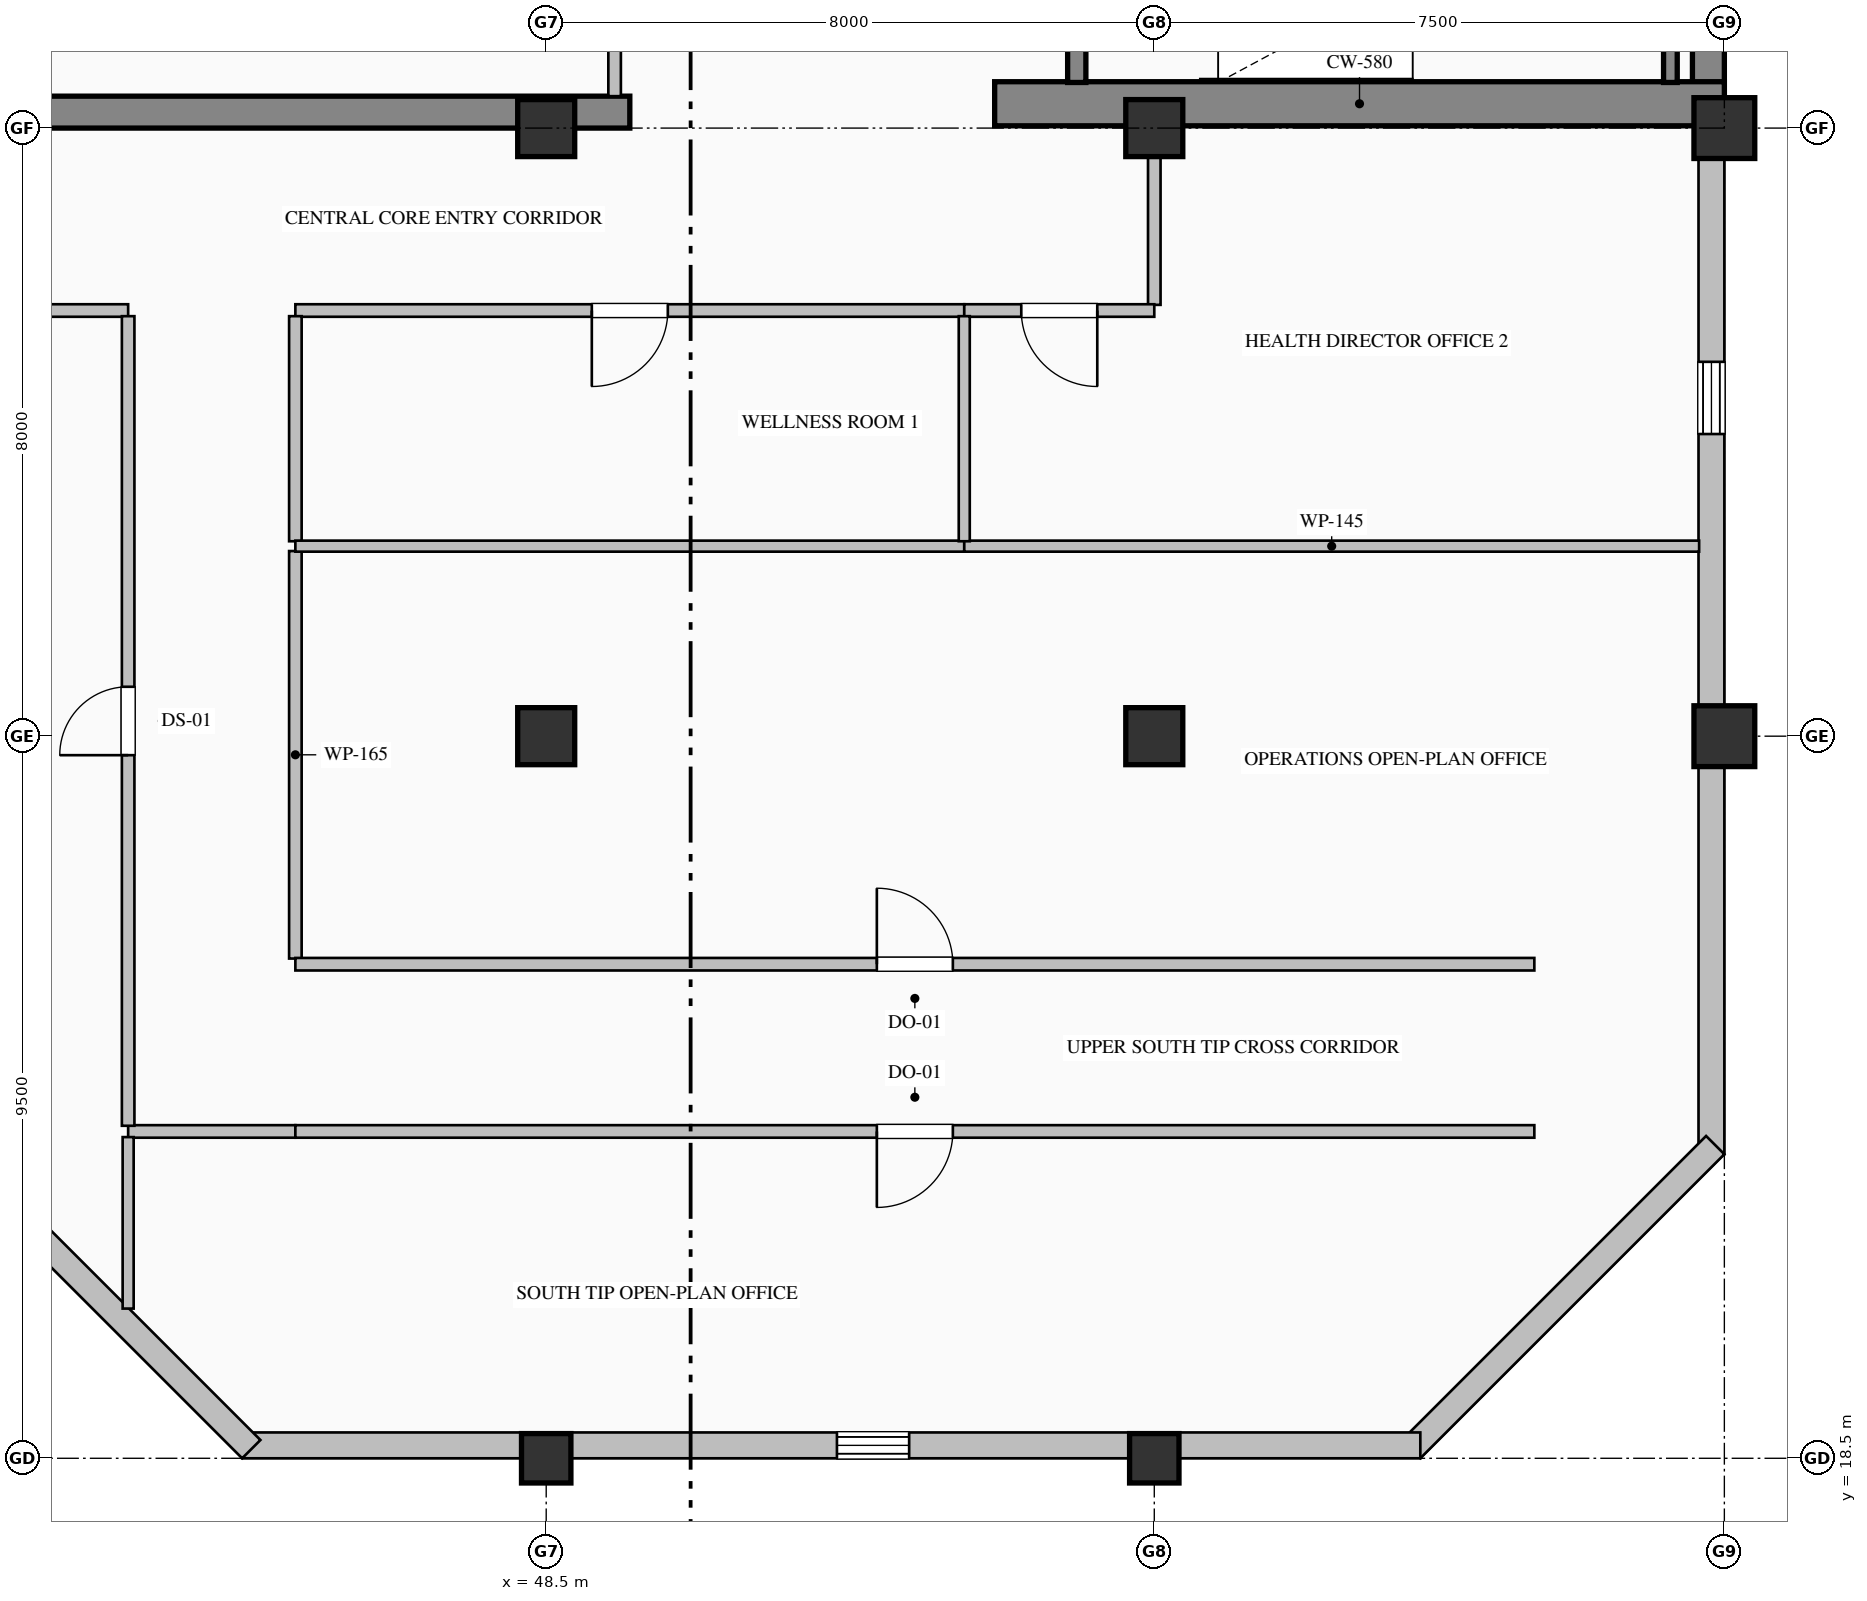
"""IFC4 building model, lengths in metres.
Left out: names, types, materials, properties, quantities, classifications, styles, units other than length and angle.
Written with IfcOpenShell. Run it as: python <this file> out.ifc"""

import sys

from ifc_helpers import new_model, si_unit, direction, frame, frame_2d, origin, origin_2d, place, context, subcontext, project, spatial, rectangle, hollow_rectangle, extrude, element, fill, save


model = new_model("IFC4")
c1 = context("Model", 3, precision=1e-05, world=origin(), true_north=direction((0.0, 1.0)))
c2 = subcontext(c1, "Body", "Model", "MODEL_VIEW")
j1 = project(units=[si_unit("LENGTHUNIT", "METRE"), si_unit("PLANEANGLEUNIT", "RADIAN")], contexts=[c1])
p1 = place(None, origin())
s1 = spatial("IfcSite", under=j1, at=p1, CompositionType="ELEMENT")
p2 = place(p1, origin())
s2 = spatial("IfcBuilding", under=s1, at=p2, CompositionType="ELEMENT")
p3 = place(p2, frame((0.0, 0.0, 347.2)))
s3 = spatial("IfcBuildingStorey", under=s2, at=p3, CompositionType="ELEMENT", Elevation=347.2)
p4 = place(p3, frame((63.79, 36.32, 0.0), z_axis=(0.0, 0.0, 1.0), x_axis=(0.0, 1.0, 0.0)))
e1 = element("IfcWall", 1, at=p4, inside=s3, PredefinedType="SHEAR", context=c2, shape_type="SweptSolid", body=[
    extrude(rectangle(XDim=15.26, YDim=0.42, at=frame_2d((7.63, 0.0))), origin(), (0.0, 0.0, 1.0), 3.785),
])
p5 = place(p3, frame((40.5, 36.21, 0.0), z_axis=(0.0, 0.0, 1.0), x_axis=(1.0, 0.0, 0.0)))
e2 = element("IfcWall", 2, at=p5, inside=s3, PredefinedType="SHEAR", context=c2, shape_type="SweptSolid", body=[
    extrude(rectangle(XDim=9.1, YDim=0.42, at=frame_2d((4.55, 0.0))), origin(), (0.0, 0.0, 1.0), 3.785),
])
p6 = place(p3, frame((54.4, 36.32, 0.0), z_axis=(0.0, 0.0, 1.0), x_axis=(1.0, 0.0, 0.0)))
e3 = element("IfcWall", 3, at=p6, inside=s3, PredefinedType="SHEAR", context=c2, shape_type="SweptSolid", body=[
    extrude(rectangle(XDim=9.6, YDim=0.58, at=frame_2d((4.8, 0.0))), origin(), (0.0, 0.0, 1.0), 4.0),
])
p7 = place(p3, frame((48.5, 18.5, 0.0), z_axis=(0.0, 0.0, 1.0), x_axis=(1.0, 0.0, 0.0)))
e4 = element("IfcColumn", 4, at=p7, inside=s3, PredefinedType="COLUMN", context=c2, shape_type="SweptSolid", body=[
    extrude(hollow_rectangle(XDim=0.65, YDim=0.65, WallThickness=0.028, at=origin_2d()), origin(), (0.0, 0.0, 1.0), 4.0),
])
for number, where, z_axis, x_axis in (
    (5, (48.5, 28.0, 0.0), (0.0, 0.0, 1.0), (1.0, 0.0, 0.0)),
    (6, (48.5, 36.0, 0.0), (0.0, 0.0, 1.0), (1.0, 0.0, 0.0)),
):
    element("IfcColumn", number, at=place(p3, frame(where, z_axis=z_axis, x_axis=x_axis)), inside=s3, PredefinedType="COLUMN", context=c2, shape_type="SweptSolid", body=[
        extrude(rectangle(XDim=0.75, YDim=0.75, at=origin_2d()), origin(), (0.0, 0.0, 1.0), 4.0),
    ])
p8 = place(p3, frame((56.5, 18.5, 0.0), z_axis=(0.0, 0.0, 1.0), x_axis=(1.0, 0.0, 0.0)))
e7 = element("IfcColumn", 7, at=p8, inside=s3, PredefinedType="COLUMN", context=c2, shape_type="SweptSolid", body=[
    extrude(hollow_rectangle(XDim=0.65, YDim=0.65, WallThickness=0.028, at=origin_2d()), origin(), (0.0, 0.0, 1.0), 4.0),
])
for number, where, z_axis, x_axis in (
    (8, (56.5, 28.0, 0.0), (0.0, 0.0, 1.0), (1.0, 0.0, 0.0)),
    (9, (56.5, 36.0, 0.0), (0.0, 0.0, 1.0), (1.0, 0.0, 0.0)),
):
    element("IfcColumn", number, at=place(p3, frame(where, z_axis=z_axis, x_axis=x_axis)), inside=s3, PredefinedType="COLUMN", context=c2, shape_type="SweptSolid", body=[
        extrude(rectangle(XDim=0.75, YDim=0.75, at=origin_2d()), origin(), (0.0, 0.0, 1.0), 4.0),
    ])
for number, where, z_axis, x_axis in (
    (10, (64.0, 28.0, 0.0), (0.0, 0.0, 1.0), (1.0, 0.0, 0.0)),
    (11, (64.0, 36.0, 0.0), (0.0, 0.0, 1.0), (1.0, 0.0, 0.0)),
):
    element("IfcColumn", number, at=place(p3, frame(where, z_axis=z_axis, x_axis=x_axis)), inside=s3, PredefinedType="COLUMN", context=c2, shape_type="SweptSolid", body=[
        extrude(hollow_rectangle(XDim=0.8, YDim=0.8, WallThickness=0.032, at=origin_2d()), origin(), (0.0, 0.0, 1.0), 4.0),
    ])
p9 = place(p3, frame((63.83, 36.05, 0.0), z_axis=(0.0, 0.0, 1.0), x_axis=(0.0, -1.0, 0.0)))
e12 = element("IfcWall", 12, at=p9, inside=s3, PredefinedType="SOLIDWALL", context=c2, shape_type="SweptSolid", body=[
    extrude(rectangle(XDim=13.55, YDim=0.34, at=frame_2d((6.775, 0.0))), origin(), (0.0, 0.0, 1.0), 3.335),
])
p10 = place(p9, frame((3.125, 0.0, 0.9)))
e13 = element("IfcOpeningElement", 13, at=p10, cuts=e12, PredefinedType="OPENING", context=c2, shape_type="SweptSolid", body=[
    extrude(rectangle(XDim=0.95, YDim=1.85, at=frame_2d((0.475, 0.925))), frame((0.0, 0.18, 0.0), z_axis=(0.0, -1.0, 0.0), x_axis=(1.0, 0.0, 0.0)), (0.0, 0.0, 1.0), 0.36),
])
p11 = place(p3, frame((63.88, 22.62, 0.0), z_axis=(0.0, 0.0, 1.0), x_axis=(-0.707106781187, -0.707106781187, 0.0)))
e14 = element("IfcWall", 14, at=p11, inside=s3, PredefinedType="SOLIDWALL", context=c2, shape_type="SweptSolid", body=[
    extrude(rectangle(XDim=5.657, YDim=0.34, at=frame_2d((2.828, 0.0))), origin(), (0.0, 0.0, 1.0), 3.785),
])
p12 = place(p3, frame((60.0, 18.67, 0.0), z_axis=(0.0, 0.0, 1.0), x_axis=(-1.0, 0.0, 0.0)))
e15 = element("IfcWall", 15, at=p12, inside=s3, PredefinedType="SOLIDWALL", context=c2, shape_type="SweptSolid", body=[
    extrude(rectangle(XDim=15.5, YDim=0.34, at=frame_2d((7.75, 0.0))), origin(), (0.0, 0.0, 1.0), 3.335),
])
p13 = place(p12, frame((6.725, 0.0, 0.9)))
e16 = element("IfcOpeningElement", 16, at=p13, cuts=e15, PredefinedType="OPENING", context=c2, shape_type="SweptSolid", body=[
    extrude(rectangle(XDim=0.95, YDim=1.85, at=frame_2d((0.475, 0.925))), frame((0.0, 0.18, 0.0), z_axis=(0.0, -1.0, 0.0), x_axis=(1.0, 0.0, 0.0)), (0.0, 0.0, 1.0), 0.36),
])
p14 = place(p3, frame((44.62, 18.62, 0.0), z_axis=(0.0, 0.0, 1.0), x_axis=(-0.707106781187, 0.707106781187, 0.0)))
e17 = element("IfcWall", 17, at=p14, inside=s3, PredefinedType="SOLIDWALL", context=c2, shape_type="SweptSolid", body=[
    extrude(rectangle(XDim=5.657, YDim=0.34, at=frame_2d((2.828, 0.0))), origin(), (0.0, 0.0, 1.0), 3.785),
])
p15 = place(p3, frame((55.48, 39.75, 0.0), z_axis=(0.0, 0.0, 1.0), x_axis=(0.0, -1.0, 0.0)))
e18 = element("IfcWall", 18, at=p15, inside=s3, PredefinedType="SOLIDWALL", context=c2, shape_type="SweptSolid", body=[
    extrude(rectangle(XDim=3.15, YDim=0.24, at=frame_2d((1.575, 0.0))), origin(), (0.0, 0.0, 1.0), 4.0),
])
p16 = place(p15, frame((1.0, 0.0, 0.0)))
e19 = element("IfcOpeningElement", 19, at=p16, cuts=e18, PredefinedType="OPENING", context=c2, shape_type="SweptSolid", body=[
    extrude(rectangle(XDim=1.15, YDim=2.2, at=frame_2d((0.575, 1.1))), frame((0.0, 0.13, 0.0), z_axis=(0.0, -1.0, 0.0), x_axis=(1.0, 0.0, 0.0)), (0.0, 0.0, 1.0), 0.26),
])
p17 = place(p3, frame((63.29, 36.6, 0.0), z_axis=(0.0, 0.0, 1.0), x_axis=(0.0, 1.0, 0.0)))
e20 = element("IfcWall", 20, at=p17, inside=s3, PredefinedType="SOLIDWALL", context=c2, shape_type="SweptSolid", body=[
    extrude(rectangle(XDim=3.15, YDim=0.18, at=frame_2d((1.575, 0.0))), origin(), (0.0, 0.0, 1.0), 4.0),
])
p18 = place(p3, frame((49.4, 36.42, 0.0), z_axis=(0.0, 0.0, 1.0), x_axis=(0.0, 1.0, 0.0)))
e21 = element("IfcWall", 21, at=p18, inside=s3, PredefinedType="PARTITIONING", context=c2, shape_type="SweptSolid", body=[
    extrude(rectangle(XDim=3.893, YDim=0.165, at=frame_2d((1.947, 0.0))), origin(), (0.0, 0.0, 1.0), 3.027),
])
p19 = place(p18, frame((1.497, 0.0, 0.0)))
e22 = element("IfcOpeningElement", 22, at=p19, cuts=e21, PredefinedType="OPENING", context=c2, shape_type="SweptSolid", body=[
    extrude(rectangle(XDim=0.9, YDim=2.15, at=frame_2d((0.45, 1.075))), frame((0.0, 0.093, 0.0), z_axis=(0.0, -1.0, 0.0), x_axis=(1.0, 0.0, 0.0)), (0.0, 0.0, 1.0), 0.185),
])
p20 = place(p3, frame((54.0, 33.6, 0.0), z_axis=(0.0, 0.0, 1.0), x_axis=(-1.0, 0.0, 0.0)))
e23 = element("IfcWall", 23, at=p20, inside=s3, PredefinedType="PARTITIONING", context=c2, shape_type="SweptSolid", body=[
    extrude(rectangle(XDim=8.8, YDim=0.165, at=frame_2d((4.4, 0.0))), origin(), (0.0, 0.0, 1.0), 3.785),
])
p21 = place(p20, frame((3.9, 0.0, 0.0)))
e24 = element("IfcOpeningElement", 24, at=p21, cuts=e23, PredefinedType="OPENING", context=c2, shape_type="SweptSolid", body=[
    extrude(rectangle(XDim=1.0, YDim=2.15, at=frame_2d((0.5, 1.075))), frame((0.0, 0.093, 0.0), z_axis=(0.0, -1.0, 0.0), x_axis=(1.0, 0.0, 0.0)), (0.0, 0.0, 1.0), 0.185),
])
p22 = place(p3, frame((56.5, 36.0, 0.0), z_axis=(0.0, 0.0, 1.0), x_axis=(0.0, -1.0, 0.0)))
e25 = element("IfcWall", 25, at=p22, inside=s3, PredefinedType="PARTITIONING", context=c2, shape_type="SweptSolid", body=[
    extrude(rectangle(XDim=2.325, YDim=0.165, at=frame_2d((1.163, 0.0))), origin(), (0.0, 0.0, 1.0), 3.177),
])
p23 = place(p3, frame((56.5, 33.6, 0.0), z_axis=(0.0, 0.0, 1.0), x_axis=(-1.0, 0.0, 0.0)))
e26 = element("IfcWall", 26, at=p23, inside=s3, PredefinedType="PARTITIONING", context=c2, shape_type="SweptSolid", body=[
    extrude(rectangle(XDim=2.5, YDim=0.165, at=frame_2d((1.25, 0.0))), origin(), (0.0, 0.0, 1.0), 3.785),
])
p24 = place(p23, frame((0.75, 0.0, 0.0)))
e27 = element("IfcOpeningElement", 27, at=p24, cuts=e26, PredefinedType="OPENING", context=c2, shape_type="SweptSolid", body=[
    extrude(rectangle(XDim=1.0, YDim=2.15, at=frame_2d((0.5, 1.075))), frame((0.0, 0.093, 0.0), z_axis=(0.0, -1.0, 0.0), x_axis=(1.0, 0.0, 0.0)), (0.0, 0.0, 1.0), 0.185),
])
p25 = place(p3, frame((43.0, 33.6, 0.0), z_axis=(0.0, 0.0, 1.0), x_axis=(-1.0, 0.0, 0.0)))
e28 = element("IfcWall", 28, at=p25, inside=s3, PredefinedType="PARTITIONING", context=c2, shape_type="SweptSolid", body=[
    extrude(rectangle(XDim=2.5, YDim=0.165, at=frame_2d((1.25, 0.0))), origin(), (0.0, 0.0, 1.0), 3.785),
])
p26 = place(p3, frame((45.2, 22.8, 0.0), z_axis=(0.0, 0.0, 1.0), x_axis=(-1.0, 0.0, 0.0)))
e29 = element("IfcWall", 29, at=p26, inside=s3, PredefinedType="PARTITIONING", context=c2, shape_type="SweptSolid", body=[
    extrude(rectangle(XDim=2.2, YDim=0.165, at=frame_2d((1.1, 0.0))), origin(), (0.0, 0.0, 1.0), 3.785),
])
p27 = place(p3, frame((45.2, 30.436, 0.0), z_axis=(0.0, 0.0, 1.0), x_axis=(0.0, -1.0, 0.0)))
e30 = element("IfcWall", 30, at=p27, inside=s3, PredefinedType="PARTITIONING", context=c2, shape_type="SweptSolid", body=[
    extrude(rectangle(XDim=5.361, YDim=0.165, at=frame_2d((2.681, 0.0))), origin(), (0.0, 0.0, 1.0), 3.785),
])
p28 = place(p3, frame((45.2, 33.525, 0.0), z_axis=(0.0, 0.0, 1.0), x_axis=(0.0, -1.0, 0.0)))
e31 = element("IfcWall", 31, at=p28, inside=s3, PredefinedType="PARTITIONING", context=c2, shape_type="SweptSolid", body=[
    extrude(rectangle(XDim=2.961, YDim=0.165, at=frame_2d((1.48, 0.0))), origin(), (0.0, 0.0, 1.0), 3.785),
])
p29 = place(p3, frame((43.0, 22.875, 0.0), z_axis=(0.0, 0.0, 1.0), x_axis=(0.0, 1.0, 0.0)))
e32 = element("IfcWall", 32, at=p29, inside=s3, PredefinedType="PARTITIONING", context=c2, shape_type="SweptSolid", body=[
    extrude(rectangle(XDim=10.651, YDim=0.165, at=frame_2d((5.325, 0.0))), origin(), (0.0, 0.0, 1.0), 3.785),
])
p30 = place(p29, frame((4.875, 0.0, 0.0)))
e33 = element("IfcOpeningElement", 33, at=p30, cuts=e32, PredefinedType="OPENING", context=c2, shape_type="SweptSolid", body=[
    extrude(rectangle(XDim=0.9, YDim=2.15, at=frame_2d((0.45, 1.075))), frame((0.0, 0.093, 0.0), z_axis=(0.0, -1.0, 0.0), x_axis=(1.0, 0.0, 0.0)), (0.0, 0.0, 1.0), 0.185),
])
p31 = place(p3, frame((61.5, 22.8, 0.0), z_axis=(0.0, 0.0, 1.0), x_axis=(-1.0, 0.0, 0.0)))
e34 = element("IfcWall", 34, at=p31, inside=s3, PredefinedType="PARTITIONING", context=c2, shape_type="SweptSolid", body=[
    extrude(rectangle(XDim=16.3, YDim=0.165, at=frame_2d((8.15, 0.0))), origin(), (0.0, 0.0, 1.0), 3.785),
])
p32 = place(p31, frame((7.65, 0.0, 0.0)))
e35 = element("IfcOpeningElement", 35, at=p32, cuts=e34, PredefinedType="OPENING", context=c2, shape_type="SweptSolid", body=[
    extrude(rectangle(XDim=1.0, YDim=2.15, at=frame_2d((0.5, 1.075))), frame((0.0, 0.093, 0.0), z_axis=(0.0, -1.0, 0.0), x_axis=(1.0, 0.0, 0.0)), (0.0, 0.0, 1.0), 0.185),
])
p33 = place(p3, frame((45.2, 25.0, 0.0), z_axis=(0.0, 0.0, 1.0), x_axis=(1.0, 0.0, 0.0)))
e36 = element("IfcWall", 36, at=p33, inside=s3, PredefinedType="PARTITIONING", context=c2, shape_type="SweptSolid", body=[
    extrude(rectangle(XDim=16.3, YDim=0.165, at=frame_2d((8.15, 0.0))), origin(), (0.0, 0.0, 1.0), 3.785),
])
p34 = place(p33, frame((7.65, 0.0, 0.0)))
e37 = element("IfcOpeningElement", 37, at=p34, cuts=e36, PredefinedType="OPENING", context=c2, shape_type="SweptSolid", body=[
    extrude(rectangle(XDim=1.0, YDim=2.15, at=frame_2d((0.5, 1.075))), frame((0.0, 0.093, 0.0), z_axis=(0.0, -1.0, 0.0), x_axis=(1.0, 0.0, 0.0)), (0.0, 0.0, 1.0), 0.185),
])
p35 = place(p3, frame((43.0, 20.469, 0.0), z_axis=(0.0, 0.0, 1.0), x_axis=(0.0, 1.0, 0.0)))
e38 = element("IfcWall", 38, at=p35, inside=s3, PredefinedType="PARTITIONING", context=c2, shape_type="SweptSolid", body=[
    extrude(rectangle(XDim=2.256, YDim=0.145, at=frame_2d((1.128, 0.0))), origin(), (0.0, 0.0, 1.0), 3.785),
])
p36 = place(p3, frame((45.2, 30.5, 0.0), z_axis=(0.0, 0.0, 1.0), x_axis=(1.0, 0.0, 0.0)))
e39 = element("IfcWall", 39, at=p36, inside=s3, PredefinedType="PARTITIONING", context=c2, shape_type="SweptSolid", body=[
    extrude(rectangle(XDim=8.8, YDim=0.145, at=frame_2d((4.4, 0.0))), origin(), (0.0, 0.0, 1.0), 3.785),
])
p37 = place(p3, frame((54.0, 30.5, 0.0), z_axis=(0.0, 0.0, 1.0), x_axis=(1.0, 0.0, 0.0)))
e40 = element("IfcWall", 40, at=p37, inside=s3, PredefinedType="PARTITIONING", context=c2, shape_type="SweptSolid", body=[
    extrude(rectangle(XDim=9.668, YDim=0.145, at=frame_2d((4.834, 0.0))), origin(), (0.0, 0.0, 1.0), 3.785),
])
p38 = place(p3, frame((54.0, 33.525, 0.0), z_axis=(0.0, 0.0, 1.0), x_axis=(0.0, -1.0, 0.0)))
e41 = element("IfcWall", 41, at=p38, inside=s3, PredefinedType="PARTITIONING", context=c2, shape_type="SweptSolid", body=[
    extrude(rectangle(XDim=2.961, YDim=0.145, at=frame_2d((1.48, 0.0))), origin(), (0.0, 0.0, 1.0), 3.785),
])
p39 = place(p10, origin())
e42 = element("IfcWindow", 42, at=p39, inside=s3, PartitioningType="SINGLE_PANEL", PredefinedType="WINDOW", context=c2, shape_type="SweptSolid", body=[
    extrude(rectangle(XDim=0.95, YDim=1.85, at=frame_2d((0.475, 0.925))), frame((0.0, 0.15, 0.0), z_axis=(0.0, -1.0, 0.0), x_axis=(1.0, 0.0, 0.0)), (0.0, 0.0, 1.0), 0.06),
])
fill(e13, e42)
p40 = place(p13, origin())
e43 = element("IfcWindow", 43, at=p40, inside=s3, PartitioningType="SINGLE_PANEL", PredefinedType="WINDOW", context=c2, shape_type="SweptSolid", body=[
    extrude(rectangle(XDim=0.95, YDim=1.85, at=frame_2d((0.475, 0.925))), frame((0.0, 0.15, 0.0), z_axis=(0.0, -1.0, 0.0), x_axis=(1.0, 0.0, 0.0)), (0.0, 0.0, 1.0), 0.06),
])
fill(e16, e43)
p41 = place(p32, origin())
e44 = element("IfcDoor", 44, at=p41, inside=s3, OperationType="SINGLE_SWING_RIGHT", PredefinedType="DOOR", context=c2, shape_type="SweptSolid", body=[
    extrude(rectangle(XDim=1.0, YDim=2.15, at=frame_2d((0.5, 1.075))), frame((0.0, 0.025, 0.0), z_axis=(0.0, -1.0, 0.0), x_axis=(1.0, 0.0, 0.0)), (0.0, 0.0, 1.0), 0.05),
])
fill(e35, e44)
p42 = place(p34, origin())
e45 = element("IfcDoor", 45, at=p42, inside=s3, OperationType="SINGLE_SWING_LEFT", PredefinedType="DOOR", context=c2, shape_type="SweptSolid", body=[
    extrude(rectangle(XDim=1.0, YDim=2.15, at=frame_2d((0.5, 1.075))), frame((0.0, 0.025, 0.0), z_axis=(0.0, -1.0, 0.0), x_axis=(1.0, 0.0, 0.0)), (0.0, 0.0, 1.0), 0.05),
])
fill(e37, e45)
p43 = place(p21, origin())
e46 = element("IfcDoor", 46, at=p43, inside=s3, OperationType="SINGLE_SWING_RIGHT", PredefinedType="DOOR", context=c2, shape_type="SweptSolid", body=[
    extrude(rectangle(XDim=1.0, YDim=2.15, at=frame_2d((0.5, 1.075))), frame((0.0, 0.025, 0.0), z_axis=(0.0, -1.0, 0.0), x_axis=(1.0, 0.0, 0.0)), (0.0, 0.0, 1.0), 0.05),
])
fill(e24, e46)
p44 = place(p24, origin())
e47 = element("IfcDoor", 47, at=p44, inside=s3, OperationType="SINGLE_SWING_LEFT", PredefinedType="DOOR", context=c2, shape_type="SweptSolid", body=[
    extrude(rectangle(XDim=1.0, YDim=2.15, at=frame_2d((0.5, 1.075))), frame((0.0, 0.025, 0.0), z_axis=(0.0, -1.0, 0.0), x_axis=(1.0, 0.0, 0.0)), (0.0, 0.0, 1.0), 0.05),
])
fill(e27, e47)
p45 = place(p30, origin())
e48 = element("IfcDoor", 48, at=p45, inside=s3, OperationType="SINGLE_SWING_LEFT", PredefinedType="DOOR", context=c2, shape_type="SweptSolid", body=[
    extrude(rectangle(XDim=0.9, YDim=2.15, at=frame_2d((0.45, 1.075))), frame((0.0, 0.025, 0.0), z_axis=(0.0, -1.0, 0.0), x_axis=(1.0, 0.0, 0.0)), (0.0, 0.0, 1.0), 0.05),
])
fill(e33, e48)
save(model, sys.argv[1])
